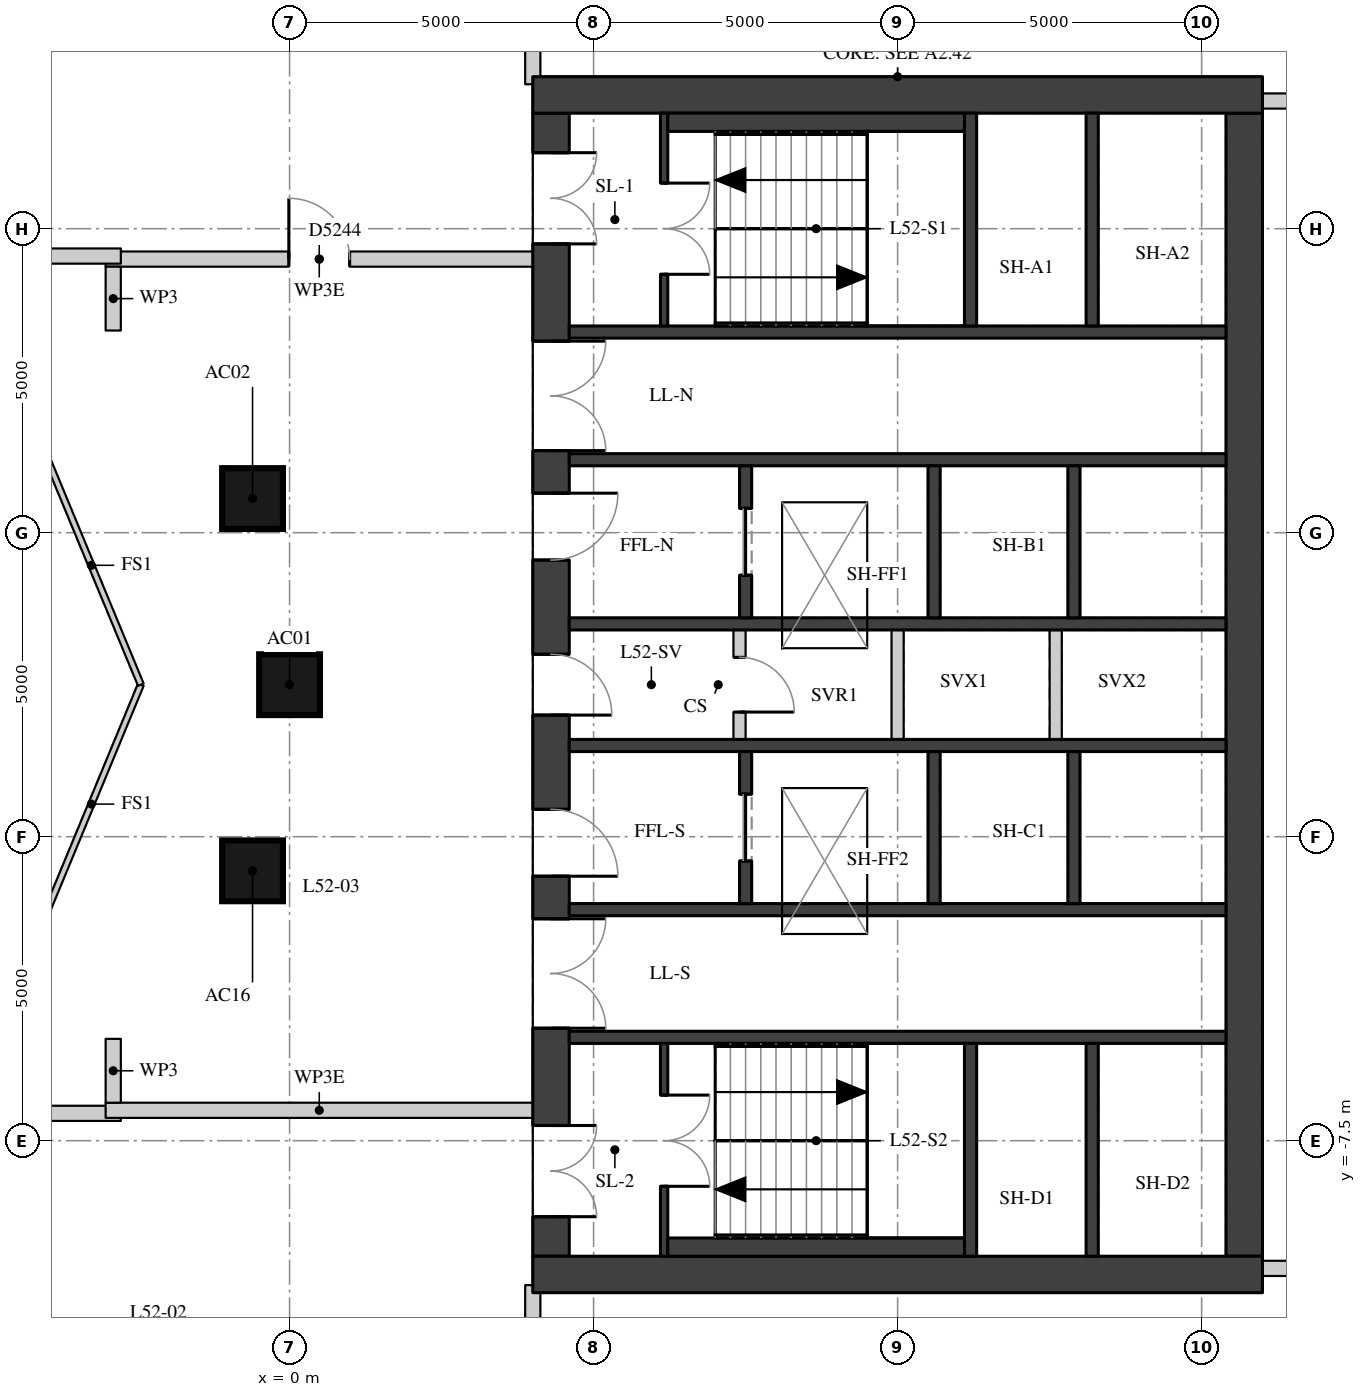
"""IFC4 building model, lengths in metres.
Left out: names, types, materials, properties, quantities, classifications, styles, units other than length and angle.
Written with IfcOpenShell. Run it as: python <this file> out.ifc"""

import sys

from ifc_helpers import new_model, si_unit, direction, frame, frame_2d, origin, origin_2d, place, context, subcontext, project, spatial, rectangle, extrude, element, fill, save


model = new_model("IFC4")
c1 = context("Model", 3, precision=1e-05, world=origin(), true_north=direction((0.0, 1.0)))
c2 = subcontext(c1, "Body", "Model", "MODEL_VIEW")
j1 = project(units=[si_unit("LENGTHUNIT", "METRE"), si_unit("PLANEANGLEUNIT", "RADIAN")], contexts=[c1])
p1 = place(None, origin())
s1 = spatial("IfcSite", under=j1, at=p1, CompositionType="ELEMENT")
p2 = place(p1, origin())
s2 = spatial("IfcBuilding", under=s1, at=p2, CompositionType="ELEMENT")
p3 = place(p2, frame((0.0, 0.0, 184.7)))
s3 = spatial("IfcBuildingStorey", under=s2, at=p3, CompositionType="ELEMENT", Elevation=184.7)
for number, where, z_axis, x_axis in (
    (1, (0.0, 0.0, 0.0), (0.0, 0.0, 1.0), (1.0, 0.0, 0.0)),
    (2, (-0.609, 3.062, 0.0), (0.0, 0.0, 1.0), (1.0, 0.0, 0.0)),
    (3, (-0.609, -3.062, 0.0), (0.0, 0.0, 1.0), (1.0, 0.0, 0.0)),
):
    element("IfcColumn", number, at=place(p3, frame(where, z_axis=z_axis, x_axis=x_axis)), inside=s3, PredefinedType="COLUMN", context=c2, shape_type="SweptSolid", body=[
        extrude(rectangle(XDim=1.0, YDim=1.0, at=origin_2d()), origin(), (0.0, 0.0, 1.0), 4.5),
    ])
p4 = place(p3, frame((4.3, -9.4, 0.0), z_axis=(0.0, 0.0, 1.0), x_axis=(0.0, 1.0, 0.0)))
e4 = element("IfcWall", 4, at=p4, inside=s3, PredefinedType="SHEAR", context=c2, shape_type="SweptSolid", body=[
    extrude(rectangle(XDim=18.8, YDim=0.6, at=frame_2d((9.4, 0.0))), origin(), (0.0, 0.0, 1.0), 4.22),
])
p5 = place(p4, frame((0.65, 0.0, 0.0)))
e5 = element("IfcOpeningElement", 5, at=p5, cuts=e4, PredefinedType="OPENING", context=c2, shape_type="SweptSolid", body=[
    extrude(rectangle(XDim=1.5, YDim=2.1, at=frame_2d((0.75, 1.05))), frame((0.0, 0.31, 0.0), z_axis=(0.0, -1.0, 0.0), x_axis=(1.0, 0.0, 0.0)), (0.0, 0.0, 1.0), 0.62),
])
p6 = place(p4, frame((3.75, 0.0, 0.0)))
e6 = element("IfcOpeningElement", 6, at=p6, cuts=e4, PredefinedType="OPENING", context=c2, shape_type="SweptSolid", body=[
    extrude(rectangle(XDim=1.8, YDim=2.1, at=frame_2d((0.9, 1.05))), frame((0.0, 0.31, 0.0), z_axis=(0.0, -1.0, 0.0), x_axis=(1.0, 0.0, 0.0)), (0.0, 0.0, 1.0), 0.62),
])
p7 = place(p4, frame((6.25, 0.0, 0.0)))
e7 = element("IfcOpeningElement", 7, at=p7, cuts=e4, PredefinedType="OPENING", context=c2, shape_type="SweptSolid", body=[
    extrude(rectangle(XDim=1.1, YDim=2.1, at=frame_2d((0.55, 1.05))), frame((0.0, 0.31, 0.0), z_axis=(0.0, -1.0, 0.0), x_axis=(1.0, 0.0, 0.0)), (0.0, 0.0, 1.0), 0.62),
])
p8 = place(p4, frame((8.9, 0.0, 0.0)))
e8 = element("IfcOpeningElement", 8, at=p8, cuts=e4, PredefinedType="OPENING", context=c2, shape_type="SweptSolid", body=[
    extrude(rectangle(XDim=1.0, YDim=2.1, at=frame_2d((0.5, 1.05))), frame((0.0, 0.31, 0.0), z_axis=(0.0, -1.0, 0.0), x_axis=(1.0, 0.0, 0.0)), (0.0, 0.0, 1.0), 0.62),
])
p9 = place(p4, frame((11.45, 0.0, 0.0)))
e9 = element("IfcOpeningElement", 9, at=p9, cuts=e4, PredefinedType="OPENING", context=c2, shape_type="SweptSolid", body=[
    extrude(rectangle(XDim=1.1, YDim=2.1, at=frame_2d((0.55, 1.05))), frame((0.0, 0.31, 0.0), z_axis=(0.0, -1.0, 0.0), x_axis=(1.0, 0.0, 0.0)), (0.0, 0.0, 1.0), 0.62),
])
p10 = place(p4, frame((13.25, 0.0, 0.0)))
e10 = element("IfcOpeningElement", 10, at=p10, cuts=e4, PredefinedType="OPENING", context=c2, shape_type="SweptSolid", body=[
    extrude(rectangle(XDim=1.8, YDim=2.1, at=frame_2d((0.9, 1.05))), frame((0.0, 0.31, 0.0), z_axis=(0.0, -1.0, 0.0), x_axis=(1.0, 0.0, 0.0)), (0.0, 0.0, 1.0), 0.62),
])
p11 = place(p4, frame((16.65, 0.0, 0.0)))
e11 = element("IfcOpeningElement", 11, at=p11, cuts=e4, PredefinedType="OPENING", context=c2, shape_type="SweptSolid", body=[
    extrude(rectangle(XDim=1.5, YDim=2.1, at=frame_2d((0.75, 1.05))), frame((0.0, 0.31, 0.0), z_axis=(0.0, -1.0, 0.0), x_axis=(1.0, 0.0, 0.0)), (0.0, 0.0, 1.0), 0.62),
])
p12 = place(p3, frame((15.7, -9.4, 0.0), z_axis=(0.0, 0.0, 1.0), x_axis=(0.0, 1.0, 0.0)))
e12 = element("IfcWall", 12, at=p12, inside=s3, PredefinedType="SHEAR", context=c2, shape_type="SweptSolid", body=[
    extrude(rectangle(XDim=18.8, YDim=0.6, at=frame_2d((9.4, 0.0))), origin(), (0.0, 0.0, 1.0), 4.22),
])
for number, where, z_axis, x_axis in (
    (13, (4.0, 9.7, 0.0), (0.0, 0.0, 1.0), (1.0, 0.0, 0.0)),
    (14, (4.0, -9.7, 0.0), (0.0, 0.0, 1.0), (1.0, 0.0, 0.0)),
):
    element("IfcWall", number, at=place(p3, frame(where, z_axis=z_axis, x_axis=x_axis)), inside=s3, PredefinedType="SHEAR", context=c2, shape_type="SweptSolid", body=[
        extrude(rectangle(XDim=12.0, YDim=0.6, at=frame_2d((6.0, 0.0))), origin(), (0.0, 0.0, 1.0), 4.22),
    ])
for number, where, z_axis, x_axis in (
    (15, (4.6, 5.8, 0.0), (0.0, 0.0, 1.0), (1.0, 0.0, 0.0)),
    (16, (4.6, 3.7, 0.0), (0.0, 0.0, 1.0), (1.0, 0.0, 0.0)),
    (17, (4.6, 1.0, 0.0), (0.0, 0.0, 1.0), (1.0, 0.0, 0.0)),
    (18, (4.6, -1.0, 0.0), (0.0, 0.0, 1.0), (1.0, 0.0, 0.0)),
    (19, (4.6, -3.7, 0.0), (0.0, 0.0, 1.0), (1.0, 0.0, 0.0)),
    (20, (4.6, -5.8, 0.0), (0.0, 0.0, 1.0), (1.0, 0.0, 0.0)),
):
    element("IfcWall", number, at=place(p3, frame(where, z_axis=z_axis, x_axis=x_axis)), inside=s3, PredefinedType="SHEAR", context=c2, shape_type="SweptSolid", body=[
        extrude(rectangle(XDim=10.8, YDim=0.2, at=frame_2d((5.4, 0.0))), origin(), (0.0, 0.0, 1.0), 4.22),
    ])
for number, where, z_axis, x_axis in (
    (21, (11.2, 5.9, 0.0), (0.0, 0.0, 1.0), (0.0, 1.0, 0.0)),
    (22, (11.2, -9.4, 0.0), (0.0, 0.0, 1.0), (0.0, 1.0, 0.0)),
    (23, (13.2, 5.9, 0.0), (0.0, 0.0, 1.0), (0.0, 1.0, 0.0)),
    (24, (13.2, -9.4, 0.0), (0.0, 0.0, 1.0), (0.0, 1.0, 0.0)),
):
    element("IfcWall", number, at=place(p3, frame(where, z_axis=z_axis, x_axis=x_axis)), inside=s3, PredefinedType="SHEAR", context=c2, shape_type="SweptSolid", body=[
        extrude(rectangle(XDim=3.5, YDim=0.2, at=frame_2d((1.75, 0.0))), origin(), (0.0, 0.0, 1.0), 4.22),
    ])
p13 = place(p3, frame((7.5, 1.1, 0.0), z_axis=(0.0, 0.0, 1.0), x_axis=(0.0, 1.0, 0.0)))
e25 = element("IfcWall", 25, at=p13, inside=s3, PredefinedType="SHEAR", context=c2, shape_type="SweptSolid", body=[
    extrude(rectangle(XDim=2.5, YDim=0.2, at=frame_2d((1.25, 0.0))), origin(), (0.0, 0.0, 1.0), 4.22),
])
p14 = place(p13, frame((0.7, 0.0, 0.0)))
e26 = element("IfcOpeningElement", 26, at=p14, cuts=e25, PredefinedType="OPENING", context=c2, shape_type="SweptSolid", body=[
    extrude(rectangle(XDim=1.1, YDim=2.1, at=frame_2d((0.55, 1.05))), frame((0.0, 0.11, 0.0), z_axis=(0.0, -1.0, 0.0), x_axis=(1.0, 0.0, 0.0)), (0.0, 0.0, 1.0), 0.22),
])
p15 = place(p3, frame((7.5, -3.6, 0.0), z_axis=(0.0, 0.0, 1.0), x_axis=(0.0, 1.0, 0.0)))
e27 = element("IfcWall", 27, at=p15, inside=s3, PredefinedType="SHEAR", context=c2, shape_type="SweptSolid", body=[
    extrude(rectangle(XDim=2.5, YDim=0.2, at=frame_2d((1.25, 0.0))), origin(), (0.0, 0.0, 1.0), 4.22),
])
p16 = place(p15, frame((0.7, 0.0, 0.0)))
e28 = element("IfcOpeningElement", 28, at=p16, cuts=e27, PredefinedType="OPENING", context=c2, shape_type="SweptSolid", body=[
    extrude(rectangle(XDim=1.1, YDim=2.1, at=frame_2d((0.55, 1.05))), frame((0.0, 0.11, 0.0), z_axis=(0.0, -1.0, 0.0), x_axis=(1.0, 0.0, 0.0)), (0.0, 0.0, 1.0), 0.22),
])
for number, where, z_axis, x_axis in (
    (29, (10.6, 1.1, 0.0), (0.0, 0.0, 1.0), (0.0, 1.0, 0.0)),
    (30, (10.6, -3.6, 0.0), (0.0, 0.0, 1.0), (0.0, 1.0, 0.0)),
    (31, (12.9, 1.1, 0.0), (0.0, 0.0, 1.0), (0.0, 1.0, 0.0)),
    (32, (12.9, -3.6, 0.0), (0.0, 0.0, 1.0), (0.0, 1.0, 0.0)),
):
    element("IfcWall", number, at=place(p3, frame(where, z_axis=z_axis, x_axis=x_axis)), inside=s3, PredefinedType="SHEAR", context=c2, shape_type="SweptSolid", body=[
        extrude(rectangle(XDim=2.5, YDim=0.2, at=frame_2d((1.25, 0.0))), origin(), (0.0, 0.0, 1.0), 4.22),
    ])
p17 = place(p3, frame((6.16, 5.9, 0.0), z_axis=(0.0, 0.0, 1.0), x_axis=(0.0, 1.0, 0.0)))
e33 = element("IfcWall", 33, at=p17, inside=s3, PredefinedType="SHEAR", context=c2, shape_type="SweptSolid", body=[
    extrude(rectangle(XDim=3.5, YDim=0.12, at=frame_2d((1.75, 0.0))), origin(), (0.0, 0.0, 1.0), 4.22),
])
p18 = place(p17, frame((0.85, 0.0, 0.0)))
e34 = element("IfcOpeningElement", 34, at=p18, cuts=e33, PredefinedType="OPENING", context=c2, shape_type="SweptSolid", body=[
    extrude(rectangle(XDim=1.5, YDim=2.1, at=frame_2d((0.75, 1.05))), frame((0.0, 0.07, 0.0), z_axis=(0.0, -1.0, 0.0), x_axis=(1.0, 0.0, 0.0)), (0.0, 0.0, 1.0), 0.14),
])
p19 = place(p3, frame((6.16, -9.4, 0.0), z_axis=(0.0, 0.0, 1.0), x_axis=(0.0, 1.0, 0.0)))
e35 = element("IfcWall", 35, at=p19, inside=s3, PredefinedType="SHEAR", context=c2, shape_type="SweptSolid", body=[
    extrude(rectangle(XDim=3.5, YDim=0.12, at=frame_2d((1.75, 0.0))), origin(), (0.0, 0.0, 1.0), 4.22),
])
p20 = place(p19, frame((1.15, 0.0, 0.0)))
e36 = element("IfcOpeningElement", 36, at=p20, cuts=e35, PredefinedType="OPENING", context=c2, shape_type="SweptSolid", body=[
    extrude(rectangle(XDim=1.5, YDim=2.1, at=frame_2d((0.75, 1.05))), frame((0.0, 0.07, 0.0), z_axis=(0.0, -1.0, 0.0), x_axis=(1.0, 0.0, 0.0)), (0.0, 0.0, 1.0), 0.14),
])
p21 = place(p3, frame((7.4, -0.9, 0.0), z_axis=(0.0, 0.0, 1.0), x_axis=(0.0, 1.0, 0.0)))
e37 = element("IfcWall", 37, at=p21, inside=s3, PredefinedType="PARTITIONING", context=c2, shape_type="SweptSolid", body=[
    extrude(rectangle(XDim=1.8, YDim=0.2, at=frame_2d((0.9, 0.0))), origin(), (0.0, 0.0, 1.0), 4.22),
])
p22 = place(p21, frame((0.45, 0.0, 0.0)))
e38 = element("IfcOpeningElement", 38, at=p22, cuts=e37, PredefinedType="OPENING", context=c2, shape_type="SweptSolid", body=[
    extrude(rectangle(XDim=0.9, YDim=2.1, at=frame_2d((0.45, 1.05))), frame((0.0, 0.11, 0.0), z_axis=(0.0, -1.0, 0.0), x_axis=(1.0, 0.0, 0.0)), (0.0, 0.0, 1.0), 0.22),
])
for number, where, z_axis, x_axis in (
    (39, (10.0, -0.9, 0.0), (0.0, 0.0, 1.0), (0.0, 1.0, 0.0)),
    (40, (12.6, -0.9, 0.0), (0.0, 0.0, 1.0), (0.0, 1.0, 0.0)),
):
    element("IfcWall", number, at=place(p3, frame(where, z_axis=z_axis, x_axis=x_axis)), inside=s3, PredefinedType="PARTITIONING", context=c2, shape_type="SweptSolid", body=[
        extrude(rectangle(XDim=1.8, YDim=0.2, at=frame_2d((0.9, 0.0))), origin(), (0.0, 0.0, 1.0), 4.22),
    ])
for number, where, z_axis, x_axis in (
    (41, (6.22, 9.25, 0.0), (0.0, 0.0, 1.0), (1.0, 0.0, 0.0)),
    (42, (6.22, -9.25, 0.0), (0.0, 0.0, 1.0), (1.0, 0.0, 0.0)),
):
    element("IfcWall", number, at=place(p3, frame(where, z_axis=z_axis, x_axis=x_axis)), inside=s3, PredefinedType="PARTITIONING", context=c2, shape_type="SweptSolid", body=[
        extrude(rectangle(XDim=4.88, YDim=0.3, at=frame_2d((2.44, 0.0))), origin(), (0.0, 0.0, 1.0), 4.22),
    ])
p23 = place(p3, frame((15.998, -9.6, 0.0), z_axis=(0.0, 0.0, 1.0), x_axis=(1.0, 0.0, 0.0)))
e43 = element("IfcWall", 43, at=p23, inside=s3, PredefinedType="PARTITIONING", context=c2, shape_type="SweptSolid", body=[
    extrude(rectangle(XDim=4.109, YDim=0.25, at=frame_2d((2.054, 0.0))), origin(), (0.0, 0.0, 1.0), 3.77),
])
p24 = place(p3, frame((-9.375, -7.05, 0.0), z_axis=(0.0, 0.0, 1.0), x_axis=(1.0, 0.0, 0.0)))
e44 = element("IfcWall", 44, at=p24, inside=s3, PredefinedType="PARTITIONING", context=c2, shape_type="SweptSolid", body=[
    extrude(rectangle(XDim=6.6, YDim=0.25, at=frame_2d((3.3, 0.0))), origin(), (0.0, 0.0, 1.0), 3.67),
])
p25 = place(p3, frame((-3.025, -7.0, 0.0), z_axis=(0.0, 0.0, 1.0), x_axis=(1.0, 0.0, 0.0)))
e45 = element("IfcWall", 45, at=p25, inside=s3, PredefinedType="PARTITIONING", context=c2, shape_type="SweptSolid", body=[
    extrude(rectangle(XDim=7.027, YDim=0.25, at=frame_2d((3.513, 0.0))), origin(), (0.0, 0.0, 1.0), 3.67),
])
p26 = place(p3, frame((-3.025, 7.0, 0.0), z_axis=(0.0, 0.0, 1.0), x_axis=(1.0, 0.0, 0.0)))
e46 = element("IfcWall", 46, at=p26, inside=s3, PredefinedType="PARTITIONING", context=c2, shape_type="SweptSolid", body=[
    extrude(rectangle(XDim=7.027, YDim=0.25, at=frame_2d((3.513, 0.0))), origin(), (0.0, 0.0, 1.0), 3.67),
])
p27 = place(p26, frame((3.013, 0.0, 0.0)))
e47 = element("IfcOpeningElement", 47, at=p27, cuts=e46, PredefinedType="OPENING", context=c2, shape_type="SweptSolid", body=[
    extrude(rectangle(XDim=1.0, YDim=2.1, at=frame_2d((0.5, 1.05))), frame((0.0, 0.135, 0.0), z_axis=(0.0, -1.0, 0.0), x_axis=(1.0, 0.0, 0.0)), (0.0, 0.0, 1.0), 0.27),
])
p28 = place(p3, frame((-9.375, 7.05, 0.0), z_axis=(0.0, 0.0, 1.0), x_axis=(1.0, 0.0, 0.0)))
e48 = element("IfcWall", 48, at=p28, inside=s3, PredefinedType="PARTITIONING", context=c2, shape_type="SweptSolid", body=[
    extrude(rectangle(XDim=6.6, YDim=0.25, at=frame_2d((3.3, 0.0))), origin(), (0.0, 0.0, 1.0), 3.67),
])
p29 = place(p3, frame((15.998, 9.6, 0.0), z_axis=(0.0, 0.0, 1.0), x_axis=(1.0, 0.0, 0.0)))
e49 = element("IfcWall", 49, at=p29, inside=s3, PredefinedType="PARTITIONING", context=c2, shape_type="SweptSolid", body=[
    extrude(rectangle(XDim=4.271, YDim=0.25, at=frame_2d((2.136, 0.0))), origin(), (0.0, 0.0, 1.0), 4.22),
])
for number, where, z_axis, x_axis in (
    (50, (-2.9, -6.875, 0.0), (0.0, 0.0, 1.0), (0.0, 1.0, 0.0)),
    (51, (-2.9, 5.825, 0.0), (0.0, 0.0, 1.0), (0.0, 1.0, 0.0)),
):
    element("IfcWall", number, at=place(p3, frame(where, z_axis=z_axis, x_axis=x_axis)), inside=s3, PredefinedType="PARTITIONING", context=c2, shape_type="SweptSolid", body=[
        extrude(rectangle(XDim=1.05, YDim=0.25, at=frame_2d((0.525, 0.0))), origin(), (0.0, 0.0, 1.0), 4.22),
    ])
for number, where, z_axis, x_axis in (
    (52, (4.0, -13.875, 0.0), (0.0, 0.0, 1.0), (0.0, 1.0, 0.0)),
    (53, (4.0, 9.875, 0.0), (0.0, 0.0, 1.0), (0.0, 1.0, 0.0)),
):
    element("IfcWall", number, at=place(p3, frame(where, z_axis=z_axis, x_axis=x_axis)), inside=s3, PredefinedType="PARTITIONING", context=c2, shape_type="SweptSolid", body=[
        extrude(rectangle(XDim=4.0, YDim=0.25, at=frame_2d((2.0, 0.0))), origin(), (0.0, 0.0, 1.0), 4.22),
    ])
for number, where, z_axis, x_axis in (
    (54, (-2.446, 0.0, 0.0), (0.0, 0.0, 1.0), (-0.383, -0.924, 0.0)),
    (55, (-4.073, 3.927, 0.0), (0.0, 0.0, 1.0), (0.383, -0.924, 0.0)),
):
    element("IfcWall", number, at=place(p3, frame(where, z_axis=z_axis, x_axis=x_axis)), inside=s3, PredefinedType="PARTITIONING", context=c2, shape_type="SweptSolid", body=[
        extrude(rectangle(XDim=4.251, YDim=0.1, at=frame_2d((2.125, 0.0))), origin(), (0.0, 0.0, 1.0), 4.22),
    ])
p30 = place(p5, origin())
e56 = element("IfcDoor", 56, at=p30, inside=s3, OperationType="DOUBLE_DOOR_SINGLE_SWING", PredefinedType="DOOR", context=c2, shape_type="SweptSolid", body=[
    extrude(rectangle(XDim=1.5, YDim=2.1, at=frame_2d((0.75, 1.05))), frame((0.0, 0.025, 0.0), z_axis=(0.0, -1.0, 0.0), x_axis=(1.0, 0.0, 0.0)), (0.0, 0.0, 1.0), 0.05),
])
fill(e5, e56)
p31 = place(p6, origin())
e57 = element("IfcDoor", 57, at=p31, inside=s3, OperationType="DOUBLE_DOOR_SINGLE_SWING", PredefinedType="DOOR", context=c2, shape_type="SweptSolid", body=[
    extrude(rectangle(XDim=1.8, YDim=2.1, at=frame_2d((0.9, 1.05))), frame((0.0, 0.025, 0.0), z_axis=(0.0, -1.0, 0.0), x_axis=(1.0, 0.0, 0.0)), (0.0, 0.0, 1.0), 0.05),
])
fill(e6, e57)
p32 = place(p7, origin())
e58 = element("IfcDoor", 58, at=p32, inside=s3, OperationType="SINGLE_SWING_RIGHT", PredefinedType="DOOR", context=c2, shape_type="SweptSolid", body=[
    extrude(rectangle(XDim=1.1, YDim=2.1, at=frame_2d((0.55, 1.05))), frame((0.0, 0.025, 0.0), z_axis=(0.0, -1.0, 0.0), x_axis=(1.0, 0.0, 0.0)), (0.0, 0.0, 1.0), 0.05),
])
fill(e7, e58)
p33 = place(p8, origin())
e59 = element("IfcDoor", 59, at=p33, inside=s3, OperationType="SINGLE_SWING_RIGHT", PredefinedType="DOOR", context=c2, shape_type="SweptSolid", body=[
    extrude(rectangle(XDim=1.0, YDim=2.1, at=frame_2d((0.5, 1.05))), frame((0.0, 0.025, 0.0), z_axis=(0.0, -1.0, 0.0), x_axis=(1.0, 0.0, 0.0)), (0.0, 0.0, 1.0), 0.05),
])
fill(e8, e59)
p34 = place(p9, origin())
e60 = element("IfcDoor", 60, at=p34, inside=s3, OperationType="SINGLE_SWING_LEFT", PredefinedType="DOOR", context=c2, shape_type="SweptSolid", body=[
    extrude(rectangle(XDim=1.1, YDim=2.1, at=frame_2d((0.55, 1.05))), frame((0.0, 0.025, 0.0), z_axis=(0.0, -1.0, 0.0), x_axis=(1.0, 0.0, 0.0)), (0.0, 0.0, 1.0), 0.05),
])
fill(e9, e60)
p35 = place(p10, origin())
e61 = element("IfcDoor", 61, at=p35, inside=s3, OperationType="DOUBLE_DOOR_SINGLE_SWING", PredefinedType="DOOR", context=c2, shape_type="SweptSolid", body=[
    extrude(rectangle(XDim=1.8, YDim=2.1, at=frame_2d((0.9, 1.05))), frame((0.0, 0.025, 0.0), z_axis=(0.0, -1.0, 0.0), x_axis=(1.0, 0.0, 0.0)), (0.0, 0.0, 1.0), 0.05),
])
fill(e10, e61)
p36 = place(p11, origin())
e62 = element("IfcDoor", 62, at=p36, inside=s3, OperationType="DOUBLE_DOOR_SINGLE_SWING", PredefinedType="DOOR", context=c2, shape_type="SweptSolid", body=[
    extrude(rectangle(XDim=1.5, YDim=2.1, at=frame_2d((0.75, 1.05))), frame((0.0, 0.025, 0.0), z_axis=(0.0, -1.0, 0.0), x_axis=(1.0, 0.0, 0.0)), (0.0, 0.0, 1.0), 0.05),
])
fill(e11, e62)
p37 = place(p18, origin())
e63 = element("IfcDoor", 63, at=p37, inside=s3, OperationType="DOUBLE_DOOR_SINGLE_SWING", PredefinedType="DOOR", context=c2, shape_type="SweptSolid", body=[
    extrude(rectangle(XDim=1.5, YDim=2.1, at=frame_2d((0.75, 1.05))), frame((0.0, 0.025, 0.0), z_axis=(0.0, -1.0, 0.0), x_axis=(1.0, 0.0, 0.0)), (0.0, 0.0, 1.0), 0.05),
])
fill(e34, e63)
p38 = place(p20, origin())
e64 = element("IfcDoor", 64, at=p38, inside=s3, OperationType="DOUBLE_DOOR_SINGLE_SWING", PredefinedType="DOOR", context=c2, shape_type="SweptSolid", body=[
    extrude(rectangle(XDim=1.5, YDim=2.1, at=frame_2d((0.75, 1.05))), frame((0.0, 0.025, 0.0), z_axis=(0.0, -1.0, 0.0), x_axis=(1.0, 0.0, 0.0)), (0.0, 0.0, 1.0), 0.05),
])
fill(e36, e64)
p39 = place(p14, origin())
e65 = element("IfcDoor", 65, at=p39, inside=s3, OperationType="DOUBLE_DOOR_SLIDING", PredefinedType="DOOR", context=c2, shape_type="SweptSolid", body=[
    extrude(rectangle(XDim=1.1, YDim=2.1, at=frame_2d((0.55, 1.05))), frame((0.0, 0.025, 0.0), z_axis=(0.0, -1.0, 0.0), x_axis=(1.0, 0.0, 0.0)), (0.0, 0.0, 1.0), 0.05),
])
fill(e26, e65)
p40 = place(p16, origin())
e66 = element("IfcDoor", 66, at=p40, inside=s3, OperationType="DOUBLE_DOOR_SLIDING", PredefinedType="DOOR", context=c2, shape_type="SweptSolid", body=[
    extrude(rectangle(XDim=1.1, YDim=2.1, at=frame_2d((0.55, 1.05))), frame((0.0, 0.025, 0.0), z_axis=(0.0, -1.0, 0.0), x_axis=(1.0, 0.0, 0.0)), (0.0, 0.0, 1.0), 0.05),
])
fill(e28, e66)
p41 = place(p22, origin())
e67 = element("IfcDoor", 67, at=p41, inside=s3, OperationType="SINGLE_SWING_RIGHT", PredefinedType="DOOR", context=c2, shape_type="SweptSolid", body=[
    extrude(rectangle(XDim=0.9, YDim=2.1, at=frame_2d((0.45, 1.05))), frame((0.0, 0.025, 0.0), z_axis=(0.0, -1.0, 0.0), x_axis=(1.0, 0.0, 0.0)), (0.0, 0.0, 1.0), 0.05),
])
fill(e38, e67)
p42 = place(p27, origin())
e68 = element("IfcDoor", 68, at=p42, inside=s3, OperationType="SINGLE_SWING_LEFT", PredefinedType="DOOR", context=c2, shape_type="SweptSolid", body=[
    extrude(rectangle(XDim=1.0, YDim=2.1, at=frame_2d((0.5, 1.05))), frame((0.0, 0.025, 0.0), z_axis=(0.0, -1.0, 0.0), x_axis=(1.0, 0.0, 0.0)), (0.0, 0.0, 1.0), 0.05),
])
fill(e47, e68)
save(model, sys.argv[1])
